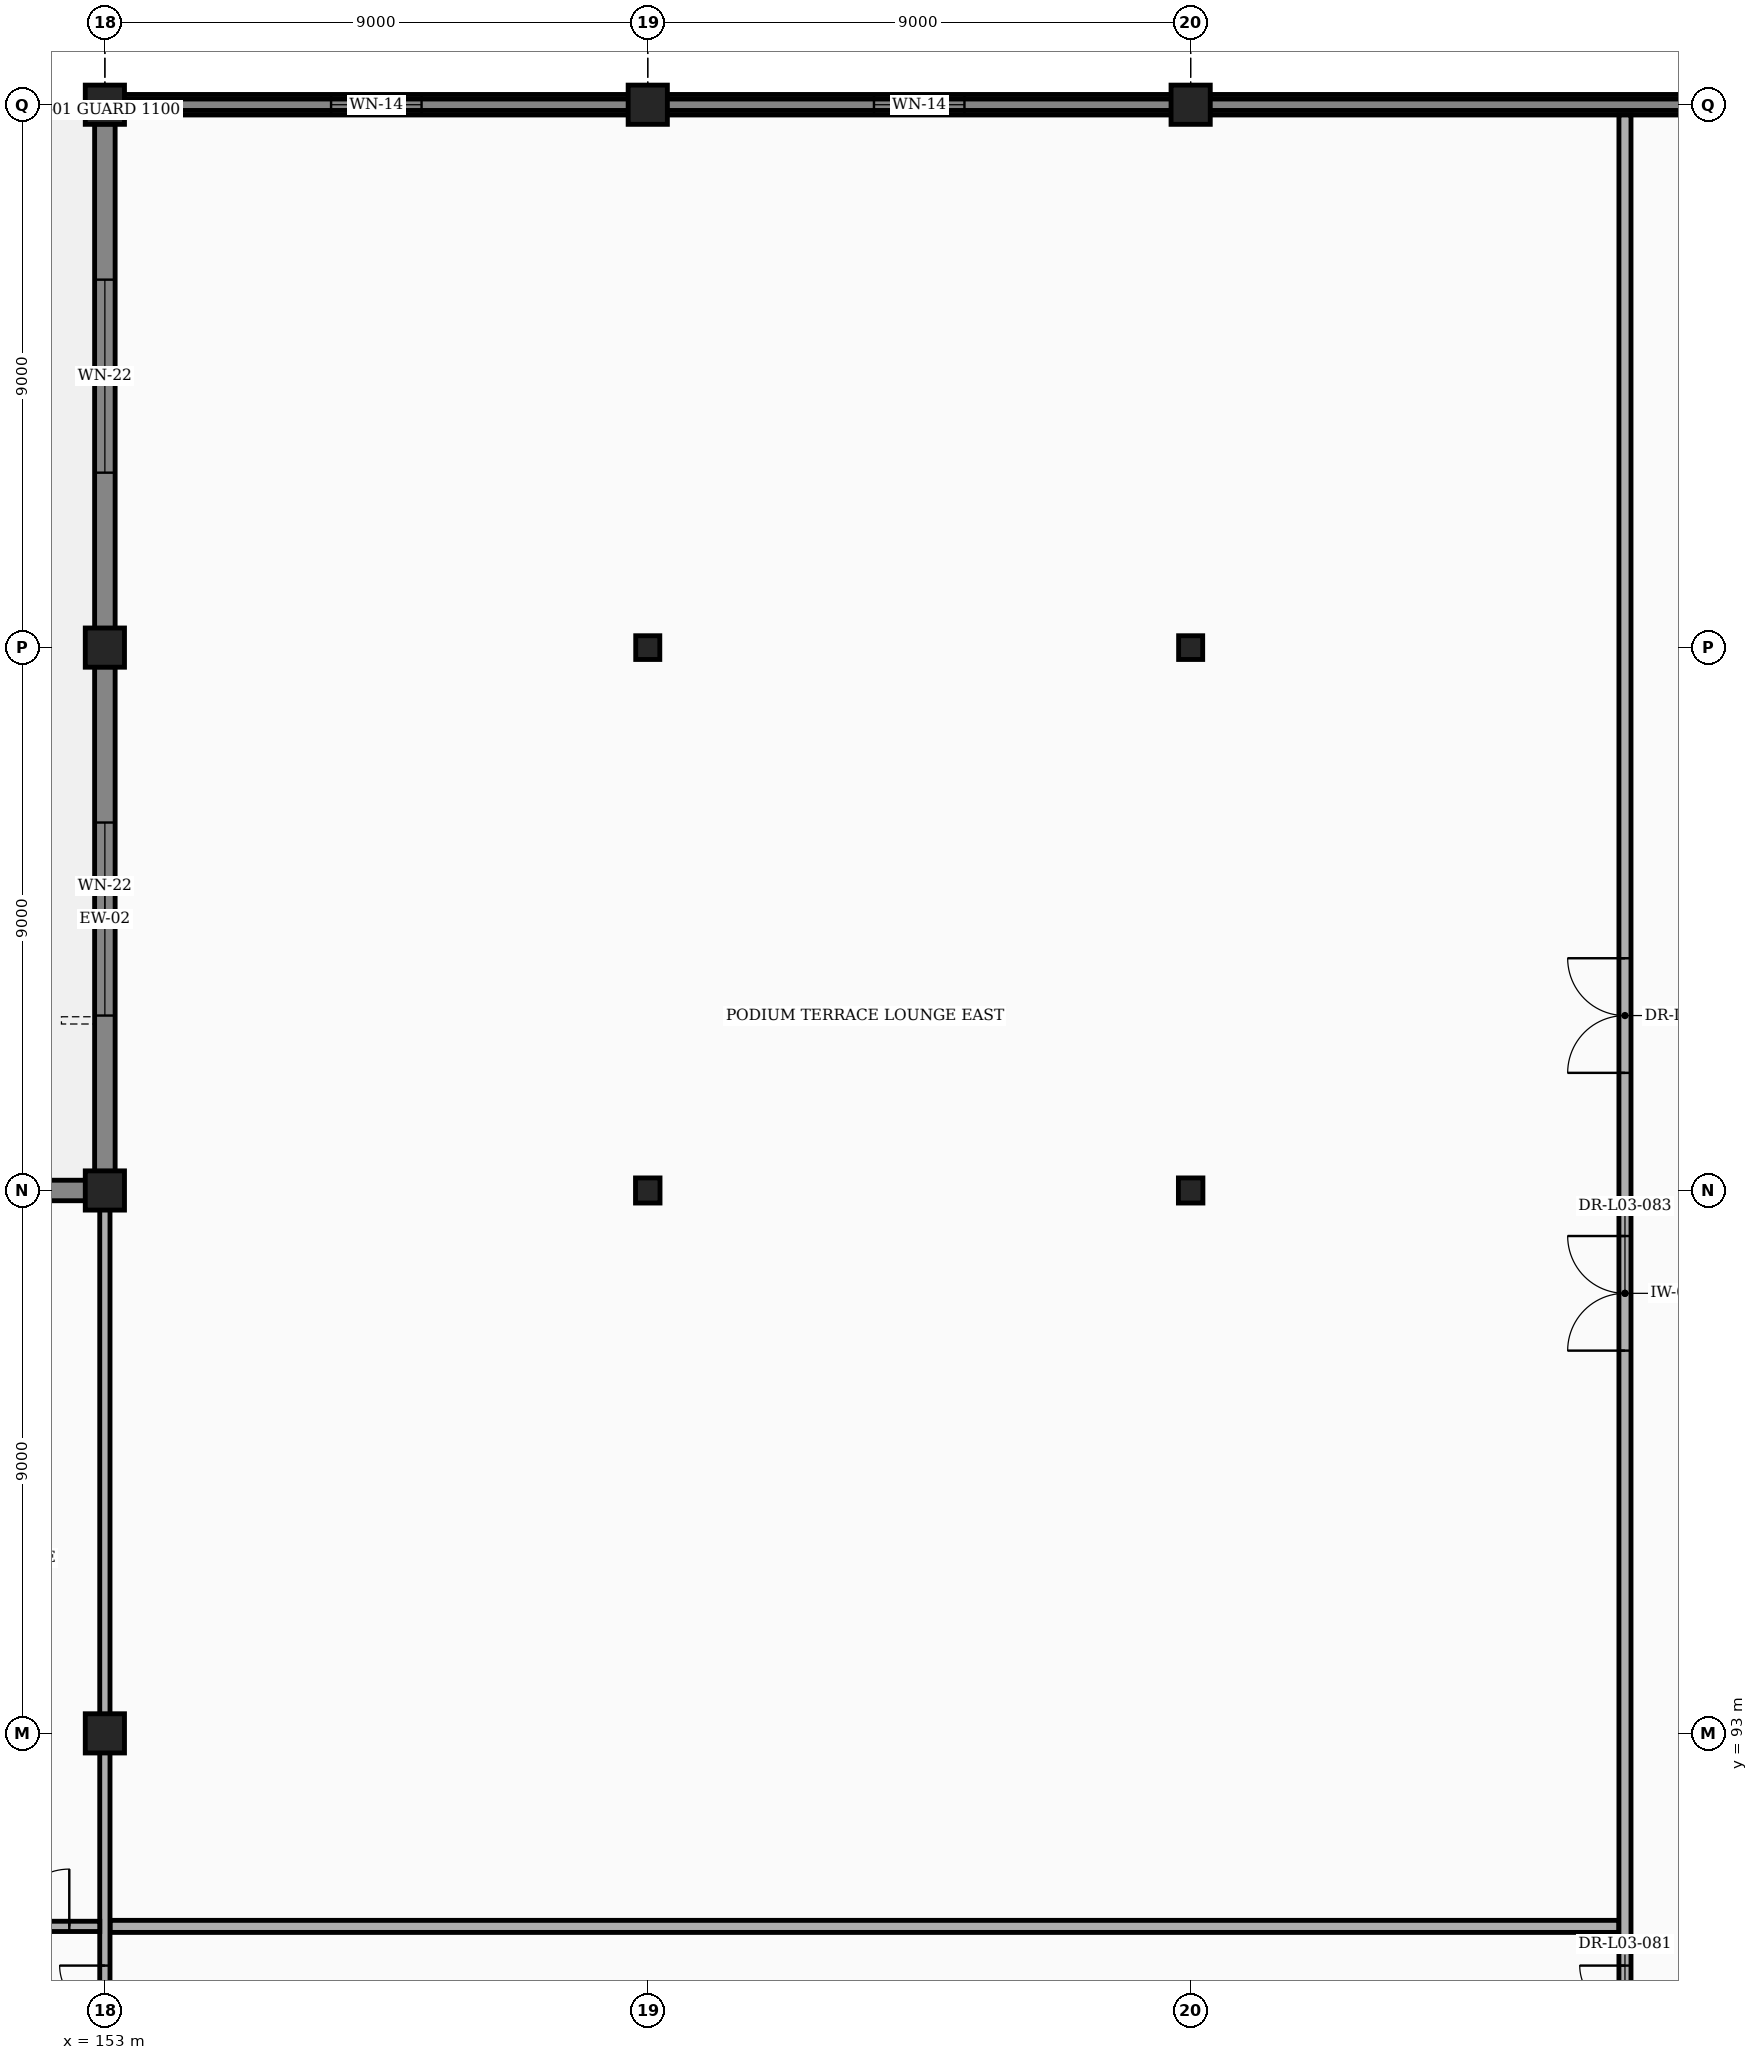
"""IFC4 building model, lengths in metres.
Left out: names, types, materials, properties, quantities, classifications, styles, units other than length and angle.
Written with IfcOpenShell. Run it as: python <this file> out.ifc"""

import sys

from ifc_helpers import new_model, si_unit, direction, frame, frame_2d, origin, origin_2d, place, context, subcontext, project, spatial, rectangle, i_section, extrude, element, fill, save


model = new_model("IFC4")
c1 = context("Model", 3, precision=1e-05, world=origin(), true_north=direction((0.0, 1.0)))
c2 = subcontext(c1, "Body", "Model", "MODEL_VIEW")
j1 = project(units=[si_unit("LENGTHUNIT", "METRE"), si_unit("PLANEANGLEUNIT", "RADIAN")], contexts=[c1])
p1 = place(None, origin())
s1 = spatial("IfcSite", under=j1, at=p1, CompositionType="ELEMENT")
p2 = place(p1, origin())
s2 = spatial("IfcBuilding", under=s1, at=p2, CompositionType="ELEMENT")
p3 = place(p2, frame((0.0, 0.0, 16.8)))
s3 = spatial("IfcBuildingStorey", under=s2, at=p3, CompositionType="ELEMENT", Elevation=16.8)
for number, where, z_axis, x_axis in (
    (1, (153.0, 93.0, 0.0), (0.0, 0.0, 1.0), (1.0, 0.0, 0.0)),
    (2, (153.0, 102.0, 0.0), (0.0, 0.0, 1.0), (1.0, 0.0, 0.0)),
    (3, (153.0, 111.0, 0.0), (0.0, 0.0, 1.0), (1.0, 0.0, 0.0)),
    (4, (153.0, 120.0, 0.0), (0.0, 0.0, 1.0), (1.0, 0.0, 0.0)),
):
    element("IfcColumn", number, at=place(p3, frame(where, z_axis=z_axis, x_axis=x_axis)), inside=s3, PredefinedType="COLUMN", context=c2, shape_type="SweptSolid", body=[
        extrude(rectangle(XDim=0.65, YDim=0.65, at=origin_2d()), origin(), (0.0, 0.0, 1.0), 4.8),
    ])
p4 = place(p3, frame((162.0, 102.0, 0.0), z_axis=(0.0, 0.0, 1.0), x_axis=(1.0, 0.0, 0.0)))
e5 = element("IfcColumn", 5, at=p4, inside=s3, PredefinedType="COLUMN", context=c2, shape_type="SweptSolid", body=[
    extrude(i_section(OverallWidth=0.406, OverallDepth=0.416, WebThickness=0.03, FlangeThickness=0.048, at=origin_2d()), origin(), (0.0, 0.0, 1.0), 4.8),
])
p5 = place(p3, frame((162.0, 111.0, 0.0), z_axis=(0.0, 0.0, 1.0), x_axis=(1.0, 0.0, 0.0)))
e6 = element("IfcColumn", 6, at=p5, inside=s3, PredefinedType="COLUMN", context=c2, shape_type="SweptSolid", body=[
    extrude(i_section(OverallWidth=0.399, OverallDepth=0.394, WebThickness=0.023, FlangeThickness=0.037, at=origin_2d()), origin(), (0.0, 0.0, 1.0), 4.8),
])
p6 = place(p3, frame((162.0, 120.0, 0.0), z_axis=(0.0, 0.0, 1.0), x_axis=(1.0, 0.0, 0.0)))
e7 = element("IfcColumn", 7, at=p6, inside=s3, PredefinedType="COLUMN", context=c2, shape_type="SweptSolid", body=[
    extrude(rectangle(XDim=0.65, YDim=0.65, at=origin_2d()), origin(), (0.0, 0.0, 1.0), 4.8),
])
p7 = place(p3, frame((171.0, 102.0, 0.0), z_axis=(0.0, 0.0, 1.0), x_axis=(1.0, 0.0, 0.0)))
e8 = element("IfcColumn", 8, at=p7, inside=s3, PredefinedType="COLUMN", context=c2, shape_type="SweptSolid", body=[
    extrude(i_section(OverallWidth=0.406, OverallDepth=0.416, WebThickness=0.03, FlangeThickness=0.048, at=origin_2d()), origin(), (0.0, 0.0, 1.0), 4.8),
])
p8 = place(p3, frame((171.0, 111.0, 0.0), z_axis=(0.0, 0.0, 1.0), x_axis=(1.0, 0.0, 0.0)))
e9 = element("IfcColumn", 9, at=p8, inside=s3, PredefinedType="COLUMN", context=c2, shape_type="SweptSolid", body=[
    extrude(i_section(OverallWidth=0.399, OverallDepth=0.394, WebThickness=0.023, FlangeThickness=0.037, at=origin_2d()), origin(), (0.0, 0.0, 1.0), 4.8),
])
p9 = place(p3, frame((171.0, 120.0, 0.0), z_axis=(0.0, 0.0, 1.0), x_axis=(1.0, 0.0, 0.0)))
e10 = element("IfcColumn", 10, at=p9, inside=s3, PredefinedType="COLUMN", context=c2, shape_type="SweptSolid", body=[
    extrude(rectangle(XDim=0.65, YDim=0.65, at=origin_2d()), origin(), (0.0, 0.0, 1.0), 4.8),
])
p10 = place(p3, frame((135.317, 102.0, 0.0), z_axis=(0.0, 0.0, 1.0), x_axis=(1.0, 0.0, 0.0)))
e11 = element("IfcWall", 11, at=p10, inside=s3, PredefinedType="STANDARD", context=c2, shape_type="SweptSolid", body=[
    extrude(rectangle(XDim=17.366, YDim=0.34, at=frame_2d((8.683, 0.0))), origin(), (0.0, 0.0, 1.0), 4.195),
])
p11 = place(p10, frame((7.933, 0.0, 0.85)))
e12 = element("IfcOpeningElement", 12, at=p11, cuts=e11, PredefinedType="OPENING", context=c2, shape_type="SweptSolid", body=[
    extrude(rectangle(XDim=1.5, YDim=1.8, at=frame_2d((0.75, 0.9))), frame((0.0, 0.182, 0.0), z_axis=(0.0, -1.0, 0.0), x_axis=(1.0, 0.0, 0.0)), (0.0, 0.0, 1.0), 0.364),
])
p12 = place(p10, frame((1.083, 0.0, 0.0)))
e13 = element("IfcOpeningElement", 13, at=p12, cuts=e11, PredefinedType="OPENING", context=c2, shape_type="SweptSolid", body=[
    extrude(rectangle(XDim=2.4, YDim=2.35, at=frame_2d((1.2, 1.175))), frame((0.0, 0.182, 0.0), z_axis=(0.0, -1.0, 0.0), x_axis=(1.0, 0.0, 0.0)), (0.0, 0.0, 1.0), 0.364),
])
p13 = place(p3, frame((153.317, 120.0, 0.0), z_axis=(0.0, 0.0, 1.0), x_axis=(1.0, 0.0, 0.0)))
e14 = element("IfcWall", 14, at=p13, inside=s3, PredefinedType="STANDARD", context=c2, shape_type="SweptSolid", body=[
    extrude(rectangle(XDim=8.366, YDim=0.34, at=frame_2d((4.183, 0.0))), origin(), (0.0, 0.0, 1.0), 4.048),
])
p14 = place(p13, frame((3.433, 0.0, 0.85)))
e15 = element("IfcOpeningElement", 15, at=p14, cuts=e14, PredefinedType="OPENING", context=c2, shape_type="SweptSolid", body=[
    extrude(rectangle(XDim=1.5, YDim=1.8, at=frame_2d((0.75, 0.9))), frame((0.0, 0.182, 0.0), z_axis=(0.0, -1.0, 0.0), x_axis=(1.0, 0.0, 0.0)), (0.0, 0.0, 1.0), 0.364),
])
p15 = place(p3, frame((162.317, 120.0, 0.0), z_axis=(0.0, 0.0, 1.0), x_axis=(1.0, 0.0, 0.0)))
e16 = element("IfcWall", 16, at=p15, inside=s3, PredefinedType="STANDARD", context=c2, shape_type="SweptSolid", body=[
    extrude(rectangle(XDim=8.366, YDim=0.34, at=frame_2d((4.183, 0.0))), origin(), (0.0, 0.0, 1.0), 4.048),
])
p16 = place(p15, frame((3.433, 0.0, 0.85)))
e17 = element("IfcOpeningElement", 17, at=p16, cuts=e16, PredefinedType="OPENING", context=c2, shape_type="SweptSolid", body=[
    extrude(rectangle(XDim=1.5, YDim=1.8, at=frame_2d((0.75, 0.9))), frame((0.0, 0.182, 0.0), z_axis=(0.0, -1.0, 0.0), x_axis=(1.0, 0.0, 0.0)), (0.0, 0.0, 1.0), 0.364),
])
p17 = place(p3, frame((171.317, 120.0, 0.0), z_axis=(0.0, 0.0, 1.0), x_axis=(1.0, 0.0, 0.0)))
e18 = element("IfcWall", 18, at=p17, inside=s3, PredefinedType="STANDARD", context=c2, shape_type="SweptSolid", body=[
    extrude(rectangle(XDim=17.366, YDim=0.34, at=frame_2d((8.683, 0.0))), origin(), (0.0, 0.0, 1.0), 4.048),
])
p18 = place(p17, frame((7.933, 0.0, 0.85)))
e19 = element("IfcOpeningElement", 19, at=p18, cuts=e18, PredefinedType="OPENING", context=c2, shape_type="SweptSolid", body=[
    extrude(rectangle(XDim=1.5, YDim=1.8, at=frame_2d((0.75, 0.9))), frame((0.0, 0.182, 0.0), z_axis=(0.0, -1.0, 0.0), x_axis=(1.0, 0.0, 0.0)), (0.0, 0.0, 1.0), 0.364),
])
p19 = place(p3, frame((153.0, 102.317, 0.0), z_axis=(0.0, 0.0, 1.0), x_axis=(0.0, 1.0, 0.0)))
e20 = element("IfcWall", 20, at=p19, inside=s3, PredefinedType="STANDARD", context=c2, shape_type="SweptSolid", body=[
    extrude(rectangle(XDim=8.366, YDim=0.34, at=frame_2d((4.183, 0.0))), origin(), (0.0, 0.0, 1.0), 4.555),
])
p20 = place(p19, frame((2.583, 0.0, 0.85)))
e21 = element("IfcOpeningElement", 21, at=p20, cuts=e20, PredefinedType="OPENING", context=c2, shape_type="SweptSolid", body=[
    extrude(rectangle(XDim=3.2, YDim=2.2, at=frame_2d((1.6, 1.1))), frame((0.0, 0.182, 0.0), z_axis=(0.0, -1.0, 0.0), x_axis=(1.0, 0.0, 0.0)), (0.0, 0.0, 1.0), 0.364),
])
p21 = place(p3, frame((153.0, 111.317, 0.0), z_axis=(0.0, 0.0, 1.0), x_axis=(0.0, 1.0, 0.0)))
e22 = element("IfcWall", 22, at=p21, inside=s3, PredefinedType="STANDARD", context=c2, shape_type="SweptSolid", body=[
    extrude(rectangle(XDim=8.366, YDim=0.34, at=frame_2d((4.183, 0.0))), origin(), (0.0, 0.0, 1.0), 4.048),
])
p22 = place(p21, frame((2.583, 0.0, 0.85)))
e23 = element("IfcOpeningElement", 23, at=p22, cuts=e22, PredefinedType="OPENING", context=c2, shape_type="SweptSolid", body=[
    extrude(rectangle(XDim=3.2, YDim=2.2, at=frame_2d((1.6, 1.1))), frame((0.0, 0.182, 0.0), z_axis=(0.0, -1.0, 0.0), x_axis=(1.0, 0.0, 0.0)), (0.0, 0.0, 1.0), 0.364),
])
p23 = place(p3, frame((153.0, 120.0, 4.8), z_axis=(0.0, 0.0, 1.0), x_axis=(1.0, 0.0, 0.0)))
e24 = element("IfcWall", 24, at=p23, inside=s3, PredefinedType="PARAPET", context=c2, shape_type="SweptSolid", body=[
    extrude(rectangle(XDim=45.0, YDim=0.19, at=frame_2d((22.5, 0.0))), origin(), (0.0, 0.0, 1.0), 1.2),
])
p24 = place(p3, frame((153.085, 89.8, 0.0), z_axis=(0.0, 0.0, 1.0), x_axis=(1.0, 0.0, 0.0)))
e25 = element("IfcWall", 25, at=p24, inside=s3, PredefinedType="PARTITIONING", context=c2, shape_type="SweptSolid", body=[
    extrude(rectangle(XDim=25.015, YDim=0.2, at=frame_2d((12.508, 0.0))), origin(), (0.0, 0.0, 1.0), 4.555),
])
p25 = place(p3, frame((178.2, 80.76, 0.0), z_axis=(0.0, 0.0, 1.0), x_axis=(0.0, 1.0, 0.0)))
e26 = element("IfcWall", 26, at=p25, inside=s3, PredefinedType="PARTITIONING", context=c2, shape_type="SweptSolid", body=[
    extrude(rectangle(XDim=39.07, YDim=0.2, at=frame_2d((19.535, 0.0))), origin(), (0.0, 0.0, 1.0), 4.555),
])
p26 = place(p25, frame((1.1, 0.0, 0.0)))
e27 = element("IfcOpeningElement", 27, at=p26, cuts=e26, PredefinedType="OPENING", context=c2, shape_type="SweptSolid", body=[
    extrude(rectangle(XDim=1.15, YDim=2.15, at=frame_2d((0.575, 1.075))), frame((0.0, 0.112, 0.0), z_axis=(0.0, -1.0, 0.0), x_axis=(1.0, 0.0, 0.0)), (0.0, 0.0, 1.0), 0.224),
])
p27 = place(p25, frame((6.89, 0.0, 0.0)))
e28 = element("IfcOpeningElement", 28, at=p27, cuts=e26, PredefinedType="OPENING", context=c2, shape_type="SweptSolid", body=[
    extrude(rectangle(XDim=1.5, YDim=2.2, at=frame_2d((0.75, 1.1))), frame((0.0, 0.112, 0.0), z_axis=(0.0, -1.0, 0.0), x_axis=(1.0, 0.0, 0.0)), (0.0, 0.0, 1.0), 0.224),
])
p28 = place(p25, frame((23.19, 0.0, 0.0)))
e29 = element("IfcOpeningElement", 29, at=p28, cuts=e26, PredefinedType="OPENING", context=c2, shape_type="SweptSolid", body=[
    extrude(rectangle(XDim=1.9, YDim=2.35, at=frame_2d((0.95, 1.175))), frame((0.0, 0.112, 0.0), z_axis=(0.0, -1.0, 0.0), x_axis=(1.0, 0.0, 0.0)), (0.0, 0.0, 1.0), 0.224),
])
p29 = place(p25, frame((18.585, 0.0, 0.0)))
e30 = element("IfcOpeningElement", 30, at=p29, cuts=e26, PredefinedType="OPENING", context=c2, shape_type="SweptSolid", body=[
    extrude(rectangle(XDim=1.9, YDim=2.35, at=frame_2d((0.95, 1.175))), frame((0.0, 0.112, 0.0), z_axis=(0.0, -1.0, 0.0), x_axis=(1.0, 0.0, 0.0)), (0.0, 0.0, 1.0), 0.224),
])
p30 = place(p3, frame((153.0, 84.22, 0.0), z_axis=(0.0, 0.0, 1.0), x_axis=(0.0, 1.0, 0.0)))
e31 = element("IfcWall", 31, at=p30, inside=s3, PredefinedType="PARTITIONING", context=c2, shape_type="SweptSolid", body=[
    extrude(rectangle(XDim=8.56, YDim=0.17, at=frame_2d((4.28, 0.0))), origin(), (0.0, 0.0, 1.0), 4.258),
])
p31 = place(p30, frame((3.43, 0.0, 0.0)))
e32 = element("IfcOpeningElement", 32, at=p31, cuts=e31, PredefinedType="OPENING", context=c2, shape_type="SweptSolid", body=[
    extrude(rectangle(XDim=1.5, YDim=2.2, at=frame_2d((0.75, 1.1))), frame((0.0, 0.097, 0.0), z_axis=(0.0, -1.0, 0.0), x_axis=(1.0, 0.0, 0.0)), (0.0, 0.0, 1.0), 0.194),
])
p32 = place(p3, frame((153.0, 93.22, 0.0), z_axis=(0.0, 0.0, 1.0), x_axis=(0.0, 1.0, 0.0)))
e33 = element("IfcWall", 33, at=p32, inside=s3, PredefinedType="PARTITIONING", context=c2, shape_type="SweptSolid", body=[
    extrude(rectangle(XDim=8.56, YDim=0.17, at=frame_2d((4.28, 0.0))), origin(), (0.0, 0.0, 1.0), 4.002),
])
p33 = place(p3, frame((147.06, 89.8, 0.0), z_axis=(0.0, 0.0, 1.0), x_axis=(1.0, 0.0, 0.0)))
e34 = element("IfcWall", 34, at=p33, inside=s3, PredefinedType="PARTITIONING", context=c2, shape_type="SweptSolid", body=[
    extrude(rectangle(XDim=5.855, YDim=0.17, at=frame_2d((2.927, 0.0))), origin(), (0.0, 0.0, 1.0), 4.555),
])
p34 = place(p33, frame((3.45, 0.0, 0.0)))
e35 = element("IfcOpeningElement", 35, at=p34, cuts=e34, PredefinedType="OPENING", context=c2, shape_type="SweptSolid", body=[
    extrude(rectangle(XDim=1.9, YDim=2.35, at=frame_2d((0.95, 1.175))), frame((0.0, 0.097, 0.0), z_axis=(0.0, -1.0, 0.0), x_axis=(1.0, 0.0, 0.0)), (0.0, 0.0, 1.0), 0.194),
])
p35 = place(p14, origin())
e36 = element("IfcWindow", 36, at=p35, inside=s3, PartitioningType="SINGLE_PANEL", PredefinedType="WINDOW", context=c2, shape_type="SweptSolid", body=[
    extrude(rectangle(XDim=1.5, YDim=1.8, at=frame_2d((0.75, 0.9))), frame((0.0, 0.03, 0.0), z_axis=(0.0, -1.0, 0.0), x_axis=(1.0, 0.0, 0.0)), (0.0, 0.0, 1.0), 0.06),
])
fill(e15, e36)
p36 = place(p16, origin())
e37 = element("IfcWindow", 37, at=p36, inside=s3, PartitioningType="SINGLE_PANEL", PredefinedType="WINDOW", context=c2, shape_type="SweptSolid", body=[
    extrude(rectangle(XDim=1.5, YDim=1.8, at=frame_2d((0.75, 0.9))), frame((0.0, 0.03, 0.0), z_axis=(0.0, -1.0, 0.0), x_axis=(1.0, 0.0, 0.0)), (0.0, 0.0, 1.0), 0.06),
])
fill(e17, e37)
p37 = place(p20, origin())
e38 = element("IfcWindow", 38, at=p37, inside=s3, PartitioningType="SINGLE_PANEL", PredefinedType="WINDOW", context=c2, shape_type="SweptSolid", body=[
    extrude(rectangle(XDim=3.2, YDim=2.2, at=frame_2d((1.6, 1.1))), frame((0.0, 0.03, 0.0), z_axis=(0.0, -1.0, 0.0), x_axis=(1.0, 0.0, 0.0)), (0.0, 0.0, 1.0), 0.06),
])
fill(e21, e38)
p38 = place(p22, origin())
e39 = element("IfcWindow", 39, at=p38, inside=s3, PartitioningType="SINGLE_PANEL", PredefinedType="WINDOW", context=c2, shape_type="SweptSolid", body=[
    extrude(rectangle(XDim=3.2, YDim=2.2, at=frame_2d((1.6, 1.1))), frame((0.0, 0.03, 0.0), z_axis=(0.0, -1.0, 0.0), x_axis=(1.0, 0.0, 0.0)), (0.0, 0.0, 1.0), 0.06),
])
fill(e23, e39)
p39 = place(p27, origin())
e40 = element("IfcDoor", 40, at=p39, inside=s3, OperationType="DOUBLE_DOOR_SINGLE_SWING", PredefinedType="DOOR", context=c2, shape_type="SweptSolid", body=[
    extrude(rectangle(XDim=1.5, YDim=2.2, at=frame_2d((0.75, 1.1))), frame((0.0, 0.025, 0.0), z_axis=(0.0, -1.0, 0.0), x_axis=(1.0, 0.0, 0.0)), (0.0, 0.0, 1.0), 0.05),
])
fill(e28, e40)
p40 = place(p28, origin())
e41 = element("IfcDoor", 41, at=p40, inside=s3, OperationType="DOUBLE_DOOR_SINGLE_SWING", PredefinedType="DOOR", context=c2, shape_type="SweptSolid", body=[
    extrude(rectangle(XDim=1.9, YDim=2.35, at=frame_2d((0.95, 1.175))), frame((0.0, 0.025, 0.0), z_axis=(0.0, -1.0, 0.0), x_axis=(1.0, 0.0, 0.0)), (0.0, 0.0, 1.0), 0.05),
])
fill(e29, e41)
p41 = place(p29, origin())
e42 = element("IfcDoor", 42, at=p41, inside=s3, OperationType="DOUBLE_DOOR_SINGLE_SWING", PredefinedType="DOOR", context=c2, shape_type="SweptSolid", body=[
    extrude(rectangle(XDim=1.9, YDim=2.35, at=frame_2d((0.95, 1.175))), frame((0.0, 0.025, 0.0), z_axis=(0.0, -1.0, 0.0), x_axis=(1.0, 0.0, 0.0)), (0.0, 0.0, 1.0), 0.05),
])
fill(e30, e42)
p42 = place(p31, origin())
e43 = element("IfcDoor", 43, at=p42, inside=s3, OperationType="DOUBLE_DOOR_SINGLE_SWING", PredefinedType="DOOR", context=c2, shape_type="SweptSolid", body=[
    extrude(rectangle(XDim=1.5, YDim=2.2, at=frame_2d((0.75, 1.1))), frame((0.0, 0.025, 0.0), z_axis=(0.0, -1.0, 0.0), x_axis=(1.0, 0.0, 0.0)), (0.0, 0.0, 1.0), 0.05),
])
fill(e32, e43)
p43 = place(p34, origin())
e44 = element("IfcDoor", 44, at=p43, inside=s3, OperationType="DOUBLE_DOOR_SINGLE_SWING", PredefinedType="DOOR", context=c2, shape_type="SweptSolid", body=[
    extrude(rectangle(XDim=1.9, YDim=2.35, at=frame_2d((0.95, 1.175))), frame((0.0, 0.025, 0.0), z_axis=(0.0, -1.0, 0.0), x_axis=(1.0, 0.0, 0.0)), (0.0, 0.0, 1.0), 0.05),
])
fill(e35, e44)
save(model, sys.argv[1])
